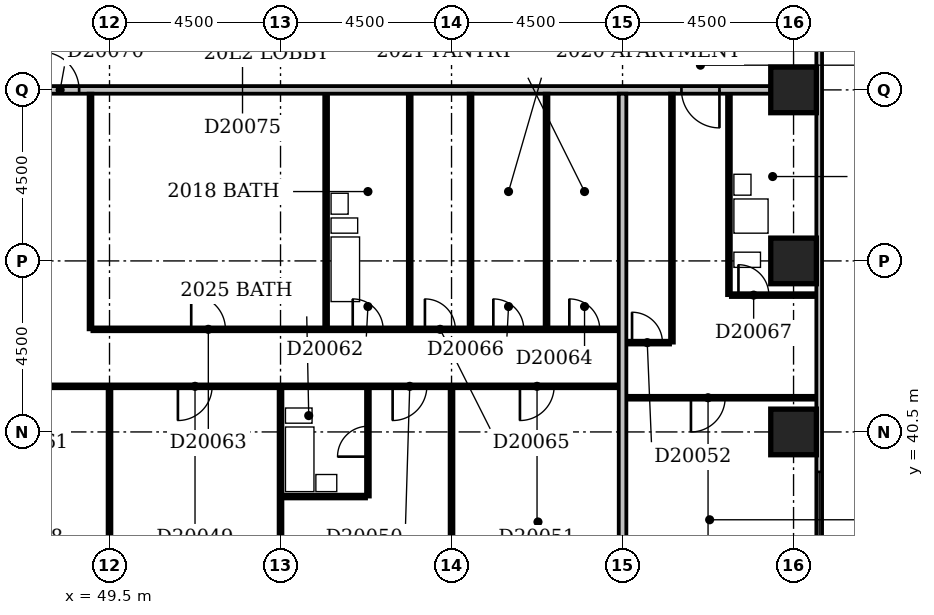
"""IFC4 building model, lengths in metres.
Left out: names, types, materials, properties, quantities, classifications, styles, units other than length and angle.
Written with IfcOpenShell. Run it as: python <this file> out.ifc"""

import sys

from ifc_helpers import new_model, si_unit, direction, frame, frame_2d, origin, origin_2d, place, context, subcontext, project, spatial, rectangle, extrude, element, fill, save


model = new_model("IFC4")
c1 = context("Model", 3, precision=1e-05, world=origin(), true_north=direction((0.0, 1.0)))
c2 = subcontext(c1, "Body", "Model", "MODEL_VIEW")
j1 = project(units=[si_unit("LENGTHUNIT", "METRE"), si_unit("PLANEANGLEUNIT", "RADIAN")], contexts=[c1])
p1 = place(None, origin())
s1 = spatial("IfcSite", under=j1, at=p1, CompositionType="ELEMENT")
p2 = place(p1, origin())
s2 = spatial("IfcBuilding", under=s1, at=p2, CompositionType="ELEMENT")
p3 = place(p2, frame((0.0, 0.0, 83.0)))
s3 = spatial("IfcBuildingStorey", under=s2, at=p3, CompositionType="ELEMENT", Elevation=83.0)
for number, where, z_axis, x_axis in (
    (1, (67.5, 40.5, -0.3), (0.0, 0.0, 1.0), (1.0, 0.0, 0.0)),
    (2, (67.5, 45.0, -0.3), (0.0, 0.0, 1.0), (1.0, 0.0, 0.0)),
    (3, (67.5, 49.5, -0.3), (0.0, 0.0, 1.0), (1.0, 0.0, 0.0)),
):
    element("IfcColumn", number, at=place(p3, frame(where, z_axis=z_axis, x_axis=x_axis)), inside=s3, PredefinedType="COLUMN", context=c2, shape_type="SweptSolid", body=[
        extrude(rectangle(XDim=1.2, YDim=1.2, at=origin_2d()), origin(), (0.0, 0.0, 1.0), 3.6),
    ])
p4 = place(p3, frame((68.175, 35.4, 0.0), z_axis=(0.0, 0.0, 1.0), x_axis=(0.0, 1.0, 0.0)))
e4 = element("IfcWall", 4, at=p4, inside=s3, PredefinedType="STANDARD", context=c2, shape_type="SweptSolid", body=[
    extrude(rectangle(XDim=23.85, YDim=0.15, at=frame_2d((11.925, 0.0))), origin(), (0.0, 0.0, 1.0), 2.7),
])
p5 = place(p4, frame((1.65, 0.0, 0.6)))
e5 = element("IfcOpeningElement", 5, at=p5, cuts=e4, PredefinedType="OPENING", context=c2, shape_type="SweptSolid", body=[
    extrude(rectangle(XDim=2.4, YDim=1.8, at=frame_2d((1.2, 0.9))), frame((0.0, 0.087, 0.0), z_axis=(0.0, -1.0, 0.0), x_axis=(1.0, 0.0, 0.0)), (0.0, 0.0, 1.0), 0.174),
])
p6 = place(p3, frame((49.5, 36.6, 0.0), z_axis=(0.0, 0.0, 1.0), x_axis=(0.0, 1.0, 0.0)))
e6 = element("IfcWall", 6, at=p6, inside=s3, PredefinedType="PARTITIONING", context=c2, shape_type="SweptSolid", body=[
    extrude(rectangle(XDim=5.05, YDim=0.1, at=frame_2d((2.525, 0.0))), origin(), (0.0, 0.0, 1.0), 3.3),
])
p7 = place(p3, frame((54.0, 36.6, 0.0), z_axis=(0.0, 0.0, 1.0), x_axis=(0.0, 1.0, 0.0)))
e7 = element("IfcWall", 7, at=p7, inside=s3, PredefinedType="PARTITIONING", context=c2, shape_type="SweptSolid", body=[
    extrude(rectangle(XDim=5.05, YDim=0.1, at=frame_2d((2.525, 0.0))), origin(), (0.0, 0.0, 1.0), 2.6),
])
p8 = place(p3, frame((58.5, 36.6, 0.0), z_axis=(0.0, 0.0, 1.0), x_axis=(0.0, 1.0, 0.0)))
e8 = element("IfcWall", 8, at=p8, inside=s3, PredefinedType="PARTITIONING", context=c2, shape_type="SweptSolid", body=[
    extrude(rectangle(XDim=5.05, YDim=0.1, at=frame_2d((2.525, 0.0))), origin(), (0.0, 0.0, 1.0), 3.3),
])
p9 = place(p3, frame((63.0, 36.6, 0.0), z_axis=(0.0, 0.0, 1.0), x_axis=(0.0, 1.0, 0.0)))
e9 = element("IfcWall", 9, at=p9, inside=s3, PredefinedType="PARTITIONING", context=c2, shape_type="SweptSolid", body=[
    extrude(rectangle(XDim=12.8, YDim=0.2, at=frame_2d((6.4, 0.0))), origin(), (0.0, 0.0, 1.0), 2.4),
])
p10 = place(p3, frame((54.05, 38.8, 0.0), z_axis=(0.0, 0.0, 1.0), x_axis=(1.0, 0.0, 0.0)))
e10 = element("IfcWall", 10, at=p10, inside=s3, PredefinedType="PLUMBINGWALL", context=c2, shape_type="SweptSolid", body=[
    extrude(rectangle(XDim=2.2, YDim=0.1, at=frame_2d((1.1, 0.0))), origin(), (0.0, 0.0, 1.0), 3.3),
])
p11 = place(p3, frame((56.3, 38.8, 0.0), z_axis=(0.0, 0.0, 1.0), x_axis=(0.0, 1.0, 0.0)))
e11 = element("IfcWall", 11, at=p11, inside=s3, PredefinedType="PLUMBINGWALL", context=c2, shape_type="SweptSolid", body=[
    extrude(rectangle(XDim=2.85, YDim=0.1, at=frame_2d((1.425, 0.0))), origin(), (0.0, 0.0, 1.0), 3.3),
])
p12 = place(p11, frame((1.05, 0.0, 0.0)))
e12 = element("IfcOpeningElement", 12, at=p12, cuts=e11, PredefinedType="OPENING", context=c2, shape_type="SweptSolid", body=[
    extrude(rectangle(XDim=0.8, YDim=2.1, at=frame_2d((0.4, 1.05))), frame((0.0, 0.062, 0.0), z_axis=(0.0, -1.0, 0.0), x_axis=(1.0, 0.0, 0.0)), (0.0, 0.0, 1.0), 0.124),
])
p13 = place(p3, frame((63.1, 41.4, 0.0), z_axis=(0.0, 0.0, 1.0), x_axis=(1.0, 0.0, 0.0)))
e13 = element("IfcWall", 13, at=p13, inside=s3, PredefinedType="PARTITIONING", context=c2, shape_type="SweptSolid", body=[
    extrude(rectangle(XDim=5.0, YDim=0.1, at=frame_2d((2.5, 0.0))), origin(), (0.0, 0.0, 1.0), 3.3),
])
p14 = place(p13, frame((1.7, 0.0, 0.0)))
e14 = element("IfcOpeningElement", 14, at=p14, cuts=e13, PredefinedType="OPENING", context=c2, shape_type="SweptSolid", body=[
    extrude(rectangle(XDim=0.9, YDim=2.1, at=frame_2d((0.45, 1.05))), frame((0.0, 0.062, 0.0), z_axis=(0.0, -1.0, 0.0), x_axis=(1.0, 0.0, 0.0)), (0.0, 0.0, 1.0), 0.124),
])
p15 = place(p3, frame((45.1, 41.7, 0.0), z_axis=(0.0, 0.0, 1.0), x_axis=(1.0, 0.0, 0.0)))
e15 = element("IfcWall", 15, at=p15, inside=s3, PredefinedType="PARTITIONING", context=c2, shape_type="SweptSolid", body=[
    extrude(rectangle(XDim=17.8, YDim=0.1, at=frame_2d((8.9, 0.0))), origin(), (0.0, 0.0, 1.0), 3.3),
])
p16 = place(p15, frame((1.7, 0.0, 0.0)))
e16 = element("IfcOpeningElement", 16, at=p16, cuts=e15, PredefinedType="OPENING", context=c2, shape_type="SweptSolid", body=[
    extrude(rectangle(XDim=0.9, YDim=2.1, at=frame_2d((0.45, 1.05))), frame((0.0, 0.062, 0.0), z_axis=(0.0, -1.0, 0.0), x_axis=(1.0, 0.0, 0.0)), (0.0, 0.0, 1.0), 0.124),
])
p17 = place(p15, frame((6.2, 0.0, 0.0)))
e17 = element("IfcOpeningElement", 17, at=p17, cuts=e15, PredefinedType="OPENING", context=c2, shape_type="SweptSolid", body=[
    extrude(rectangle(XDim=0.9, YDim=2.1, at=frame_2d((0.45, 1.05))), frame((0.0, 0.062, 0.0), z_axis=(0.0, -1.0, 0.0), x_axis=(1.0, 0.0, 0.0)), (0.0, 0.0, 1.0), 0.124),
])
p18 = place(p15, frame((11.85, 0.0, 0.0)))
e18 = element("IfcOpeningElement", 18, at=p18, cuts=e15, PredefinedType="OPENING", context=c2, shape_type="SweptSolid", body=[
    extrude(rectangle(XDim=0.9, YDim=2.1, at=frame_2d((0.45, 1.05))), frame((0.0, 0.062, 0.0), z_axis=(0.0, -1.0, 0.0), x_axis=(1.0, 0.0, 0.0)), (0.0, 0.0, 1.0), 0.124),
])
p19 = place(p15, frame((15.2, 0.0, 0.0)))
e19 = element("IfcOpeningElement", 19, at=p19, cuts=e15, PredefinedType="OPENING", context=c2, shape_type="SweptSolid", body=[
    extrude(rectangle(XDim=0.9, YDim=2.1, at=frame_2d((0.45, 1.05))), frame((0.0, 0.062, 0.0), z_axis=(0.0, -1.0, 0.0), x_axis=(1.0, 0.0, 0.0)), (0.0, 0.0, 1.0), 0.124),
])
p20 = place(p3, frame((63.1, 42.85, 0.0), z_axis=(0.0, 0.0, 1.0), x_axis=(1.0, 0.0, 0.0)))
e20 = element("IfcWall", 20, at=p20, inside=s3, PredefinedType="PARTITIONING", context=c2, shape_type="SweptSolid", body=[
    extrude(rectangle(XDim=1.15, YDim=0.1, at=frame_2d((0.575, 0.0))), origin(), (0.0, 0.0, 1.0), 3.3),
])
p21 = place(p20, frame((0.15, 0.0, 0.0)))
e21 = element("IfcOpeningElement", 21, at=p21, cuts=e20, PredefinedType="OPENING", context=c2, shape_type="SweptSolid", body=[
    extrude(rectangle(XDim=0.8, YDim=2.1, at=frame_2d((0.4, 1.05))), frame((0.0, 0.062, 0.0), z_axis=(0.0, -1.0, 0.0), x_axis=(1.0, 0.0, 0.0)), (0.0, 0.0, 1.0), 0.124),
])
p22 = place(p3, frame((64.3, 42.85, 0.0), z_axis=(0.0, 0.0, 1.0), x_axis=(0.0, 1.0, 0.0)))
e22 = element("IfcWall", 22, at=p22, inside=s3, PredefinedType="PARTITIONING", context=c2, shape_type="SweptSolid", body=[
    extrude(rectangle(XDim=6.55, YDim=0.1, at=frame_2d((3.275, 0.0))), origin(), (0.0, 0.0, 1.0), 3.3),
])
p23 = place(p3, frame((49.0, 43.2, 0.0), z_axis=(0.0, 0.0, 1.0), x_axis=(0.0, 1.0, 0.0)))
e23 = element("IfcWall", 23, at=p23, inside=s3, PredefinedType="PARTITIONING", context=c2, shape_type="SweptSolid", body=[
    extrude(rectangle(XDim=6.2, YDim=0.1, at=frame_2d((3.1, 0.0))), origin(), (0.0, 0.0, 1.0), 3.3),
])
p24 = place(p3, frame((49.05, 43.2, 0.0), z_axis=(0.0, 0.0, 1.0), x_axis=(1.0, 0.0, 0.0)))
e24 = element("IfcWall", 24, at=p24, inside=s3, PredefinedType="PARTITIONING", context=c2, shape_type="SweptSolid", body=[
    extrude(rectangle(XDim=13.85, YDim=0.1, at=frame_2d((6.925, 0.0))), origin(), (0.0, 0.0, 1.0), 3.3),
])
p25 = place(p24, frame((6.85, 0.0, 0.0)))
e25 = element("IfcOpeningElement", 25, at=p25, cuts=e24, PredefinedType="OPENING", context=c2, shape_type="SweptSolid", body=[
    extrude(rectangle(XDim=0.8, YDim=2.1, at=frame_2d((0.4, 1.05))), frame((0.0, 0.062, 0.0), z_axis=(0.0, -1.0, 0.0), x_axis=(1.0, 0.0, 0.0)), (0.0, 0.0, 1.0), 0.124),
])
p26 = place(p24, frame((2.6, 0.0, 0.0)))
e26 = element("IfcOpeningElement", 26, at=p26, cuts=e24, PredefinedType="OPENING", context=c2, shape_type="SweptSolid", body=[
    extrude(rectangle(XDim=0.9, YDim=2.1, at=frame_2d((0.45, 1.05))), frame((0.0, 0.062, 0.0), z_axis=(0.0, -1.0, 0.0), x_axis=(1.0, 0.0, 0.0)), (0.0, 0.0, 1.0), 0.124),
])
p27 = place(p24, frame((12.55, 0.0, 0.0)))
e27 = element("IfcOpeningElement", 27, at=p27, cuts=e24, PredefinedType="OPENING", context=c2, shape_type="SweptSolid", body=[
    extrude(rectangle(XDim=0.8, YDim=2.1, at=frame_2d((0.4, 1.05))), frame((0.0, 0.062, 0.0), z_axis=(0.0, -1.0, 0.0), x_axis=(1.0, 0.0, 0.0)), (0.0, 0.0, 1.0), 0.124),
])
p28 = place(p24, frame((8.75, 0.0, 0.0)))
e28 = element("IfcOpeningElement", 28, at=p28, cuts=e24, PredefinedType="OPENING", context=c2, shape_type="SweptSolid", body=[
    extrude(rectangle(XDim=0.8, YDim=2.1, at=frame_2d((0.4, 1.05))), frame((0.0, 0.062, 0.0), z_axis=(0.0, -1.0, 0.0), x_axis=(1.0, 0.0, 0.0)), (0.0, 0.0, 1.0), 0.124),
])
p29 = place(p24, frame((10.55, 0.0, 0.0)))
e29 = element("IfcOpeningElement", 29, at=p29, cuts=e24, PredefinedType="OPENING", context=c2, shape_type="SweptSolid", body=[
    extrude(rectangle(XDim=0.8, YDim=2.1, at=frame_2d((0.4, 1.05))), frame((0.0, 0.062, 0.0), z_axis=(0.0, -1.0, 0.0), x_axis=(1.0, 0.0, 0.0)), (0.0, 0.0, 1.0), 0.124),
])
for number, where, z_axis, x_axis in (
    (30, (55.2, 43.25, 0.0), (0.0, 0.0, 1.0), (0.0, 1.0, 0.0)),
    (31, (57.4, 43.25, 0.0), (0.0, 0.0, 1.0), (0.0, 1.0, 0.0)),
):
    element("IfcWall", number, at=place(p3, frame(where, z_axis=z_axis, x_axis=x_axis)), inside=s3, PredefinedType="PLUMBINGWALL", context=c2, shape_type="SweptSolid", body=[
        extrude(rectangle(XDim=6.15, YDim=0.1, at=frame_2d((3.075, 0.0))), origin(), (0.0, 0.0, 1.0), 3.3),
    ])
for number, where, z_axis, x_axis in (
    (32, (59.0, 43.25, 0.0), (0.0, 0.0, 1.0), (0.0, 1.0, 0.0)),
    (33, (61.0, 43.25, 0.0), (0.0, 0.0, 1.0), (0.0, 1.0, 0.0)),
):
    element("IfcWall", number, at=place(p3, frame(where, z_axis=z_axis, x_axis=x_axis)), inside=s3, PredefinedType="PARTITIONING", context=c2, shape_type="SweptSolid", body=[
        extrude(rectangle(XDim=6.15, YDim=0.1, at=frame_2d((3.075, 0.0))), origin(), (0.0, 0.0, 1.0), 3.3),
    ])
p30 = place(p3, frame((65.8, 44.1, 0.0), z_axis=(0.0, 0.0, 1.0), x_axis=(0.0, 1.0, 0.0)))
e34 = element("IfcWall", 34, at=p30, inside=s3, PredefinedType="PLUMBINGWALL", context=c2, shape_type="SweptSolid", body=[
    extrude(rectangle(XDim=5.3, YDim=0.1, at=frame_2d((2.65, 0.0))), origin(), (0.0, 0.0, 1.0), 3.3),
])
p31 = place(p3, frame((65.85, 44.1, 0.0), z_axis=(0.0, 0.0, 1.0), x_axis=(1.0, 0.0, 0.0)))
e35 = element("IfcWall", 35, at=p31, inside=s3, PredefinedType="PARTITIONING", context=c2, shape_type="SweptSolid", body=[
    extrude(rectangle(XDim=2.25, YDim=0.1, at=frame_2d((1.125, 0.0))), origin(), (0.0, 0.0, 1.0), 3.3),
])
p32 = place(p31, frame((0.2, 0.0, 0.0)))
e36 = element("IfcOpeningElement", 36, at=p32, cuts=e35, PredefinedType="OPENING", context=c2, shape_type="SweptSolid", body=[
    extrude(rectangle(XDim=0.8, YDim=2.1, at=frame_2d((0.4, 1.05))), frame((0.0, 0.062, 0.0), z_axis=(0.0, -1.0, 0.0), x_axis=(1.0, 0.0, 0.0)), (0.0, 0.0, 1.0), 0.124),
])
p33 = place(p3, frame((9.1, 49.5, 0.0), z_axis=(0.0, 0.0, 1.0), x_axis=(1.0, 0.0, 0.0)))
e37 = element("IfcWall", 37, at=p33, inside=s3, PredefinedType="PARTITIONING", context=c2, shape_type="SweptSolid", body=[
    extrude(rectangle(XDim=57.8, YDim=0.2, at=frame_2d((28.9, 0.0))), origin(), (0.0, 0.0, 1.0), 3.3),
])
p34 = place(p33, frame((13.7, 0.0, 0.0)))
e38 = element("IfcOpeningElement", 38, at=p34, cuts=e37, PredefinedType="OPENING", context=c2, shape_type="SweptSolid", body=[
    extrude(rectangle(XDim=1.0, YDim=2.1, at=frame_2d((0.5, 1.05))), frame((0.0, 0.112, 0.0), z_axis=(0.0, -1.0, 0.0), x_axis=(1.0, 0.0, 0.0)), (0.0, 0.0, 1.0), 0.224),
])
p35 = place(p33, frame((22.7, 0.0, 0.0)))
e39 = element("IfcOpeningElement", 39, at=p35, cuts=e37, PredefinedType="OPENING", context=c2, shape_type="SweptSolid", body=[
    extrude(rectangle(XDim=1.0, YDim=2.1, at=frame_2d((0.5, 1.05))), frame((0.0, 0.112, 0.0), z_axis=(0.0, -1.0, 0.0), x_axis=(1.0, 0.0, 0.0)), (0.0, 0.0, 1.0), 0.224),
])
p36 = place(p33, frame((38.6, 0.0, 0.0)))
e40 = element("IfcOpeningElement", 40, at=p36, cuts=e37, PredefinedType="OPENING", context=c2, shape_type="SweptSolid", body=[
    extrude(rectangle(XDim=1.0, YDim=2.1, at=frame_2d((0.5, 1.05))), frame((0.0, 0.112, 0.0), z_axis=(0.0, -1.0, 0.0), x_axis=(1.0, 0.0, 0.0)), (0.0, 0.0, 1.0), 0.224),
])
p37 = place(p33, frame((55.45, 0.0, 0.0)))
e41 = element("IfcOpeningElement", 41, at=p37, cuts=e37, PredefinedType="OPENING", context=c2, shape_type="SweptSolid", body=[
    extrude(rectangle(XDim=1.0, YDim=2.1, at=frame_2d((0.5, 1.05))), frame((0.0, 0.112, 0.0), z_axis=(0.0, -1.0, 0.0), x_axis=(1.0, 0.0, 0.0)), (0.0, 0.0, 1.0), 0.224),
])
p38 = place(p33, frame((6.15, 0.0, 0.0)))
e42 = element("IfcOpeningElement", 42, at=p38, cuts=e37, PredefinedType="OPENING", context=c2, shape_type="SweptSolid", body=[
    extrude(rectangle(XDim=0.9, YDim=2.1, at=frame_2d((0.45, 1.05))), frame((0.0, 0.112, 0.0), z_axis=(0.0, -1.0, 0.0), x_axis=(1.0, 0.0, 0.0)), (0.0, 0.0, 1.0), 0.224),
])
p39 = place(p5, origin())
e43 = element("IfcWindow", 43, at=p39, inside=s3, PartitioningType="SINGLE_PANEL", PredefinedType="WINDOW", context=c2, shape_type="SweptSolid", body=[
    extrude(rectangle(XDim=2.4, YDim=1.8, at=frame_2d((1.2, 0.9))), frame((0.0, 0.03, 0.0), z_axis=(0.0, -1.0, 0.0), x_axis=(1.0, 0.0, 0.0)), (0.0, 0.0, 1.0), 0.06),
])
fill(e5, e43)
p40 = place(p12, origin())
e44 = element("IfcDoor", 44, at=p40, inside=s3, OperationType="SINGLE_SWING_LEFT", PredefinedType="DOOR", context=c2, shape_type="SweptSolid", body=[
    extrude(rectangle(XDim=0.8, YDim=2.1, at=frame_2d((0.4, 1.05))), frame((0.0, 0.025, 0.0), z_axis=(0.0, -1.0, 0.0), x_axis=(1.0, 0.0, 0.0)), (0.0, 0.0, 1.0), 0.05),
])
fill(e12, e44)
p41 = place(p14, frame((0.9, 0.0, 0.0), z_axis=(0.0, 0.0, 1.0), x_axis=(-1.0, 0.0, 0.0)))
e45 = element("IfcDoor", 45, at=p41, inside=s3, OperationType="SINGLE_SWING_RIGHT", PredefinedType="DOOR", context=c2, shape_type="SweptSolid", body=[
    extrude(rectangle(XDim=0.9, YDim=2.1, at=frame_2d((0.45, 1.05))), frame((0.0, 0.025, 0.0), z_axis=(0.0, -1.0, 0.0), x_axis=(1.0, 0.0, 0.0)), (0.0, 0.0, 1.0), 0.05),
])
fill(e14, e45)
p42 = place(p17, frame((0.9, 0.0, 0.0), z_axis=(0.0, 0.0, 1.0), x_axis=(-1.0, 0.0, 0.0)))
e46 = element("IfcDoor", 46, at=p42, inside=s3, OperationType="SINGLE_SWING_RIGHT", PredefinedType="DOOR", context=c2, shape_type="SweptSolid", body=[
    extrude(rectangle(XDim=0.9, YDim=2.1, at=frame_2d((0.45, 1.05))), frame((0.0, 0.025, 0.0), z_axis=(0.0, -1.0, 0.0), x_axis=(1.0, 0.0, 0.0)), (0.0, 0.0, 1.0), 0.05),
])
fill(e17, e46)
p43 = place(p18, frame((0.9, 0.0, 0.0), z_axis=(0.0, 0.0, 1.0), x_axis=(-1.0, 0.0, 0.0)))
e47 = element("IfcDoor", 47, at=p43, inside=s3, OperationType="SINGLE_SWING_RIGHT", PredefinedType="DOOR", context=c2, shape_type="SweptSolid", body=[
    extrude(rectangle(XDim=0.9, YDim=2.1, at=frame_2d((0.45, 1.05))), frame((0.0, 0.025, 0.0), z_axis=(0.0, -1.0, 0.0), x_axis=(1.0, 0.0, 0.0)), (0.0, 0.0, 1.0), 0.05),
])
fill(e18, e47)
p44 = place(p19, frame((0.9, 0.0, 0.0), z_axis=(0.0, 0.0, 1.0), x_axis=(-1.0, 0.0, 0.0)))
e48 = element("IfcDoor", 48, at=p44, inside=s3, OperationType="SINGLE_SWING_RIGHT", PredefinedType="DOOR", context=c2, shape_type="SweptSolid", body=[
    extrude(rectangle(XDim=0.9, YDim=2.1, at=frame_2d((0.45, 1.05))), frame((0.0, 0.025, 0.0), z_axis=(0.0, -1.0, 0.0), x_axis=(1.0, 0.0, 0.0)), (0.0, 0.0, 1.0), 0.05),
])
fill(e19, e48)
p45 = place(p21, origin())
e49 = element("IfcDoor", 49, at=p45, inside=s3, OperationType="SINGLE_SWING_LEFT", PredefinedType="DOOR", context=c2, shape_type="SweptSolid", body=[
    extrude(rectangle(XDim=0.8, YDim=2.1, at=frame_2d((0.4, 1.05))), frame((0.0, 0.025, 0.0), z_axis=(0.0, -1.0, 0.0), x_axis=(1.0, 0.0, 0.0)), (0.0, 0.0, 1.0), 0.05),
])
fill(e21, e49)
p46 = place(p25, origin())
e50 = element("IfcDoor", 50, at=p46, inside=s3, OperationType="SINGLE_SWING_LEFT", PredefinedType="DOOR", context=c2, shape_type="SweptSolid", body=[
    extrude(rectangle(XDim=0.8, YDim=2.1, at=frame_2d((0.4, 1.05))), frame((0.0, 0.025, 0.0), z_axis=(0.0, -1.0, 0.0), x_axis=(1.0, 0.0, 0.0)), (0.0, 0.0, 1.0), 0.05),
])
fill(e25, e50)
p47 = place(p26, origin())
e51 = element("IfcDoor", 51, at=p47, inside=s3, OperationType="SINGLE_SWING_LEFT", PredefinedType="DOOR", context=c2, shape_type="SweptSolid", body=[
    extrude(rectangle(XDim=0.9, YDim=2.1, at=frame_2d((0.45, 1.05))), frame((0.0, 0.025, 0.0), z_axis=(0.0, -1.0, 0.0), x_axis=(1.0, 0.0, 0.0)), (0.0, 0.0, 1.0), 0.05),
])
fill(e26, e51)
p48 = place(p27, origin())
e52 = element("IfcDoor", 52, at=p48, inside=s3, OperationType="SINGLE_SWING_LEFT", PredefinedType="DOOR", context=c2, shape_type="SweptSolid", body=[
    extrude(rectangle(XDim=0.8, YDim=2.1, at=frame_2d((0.4, 1.05))), frame((0.0, 0.025, 0.0), z_axis=(0.0, -1.0, 0.0), x_axis=(1.0, 0.0, 0.0)), (0.0, 0.0, 1.0), 0.05),
])
fill(e27, e52)
p49 = place(p28, origin())
e53 = element("IfcDoor", 53, at=p49, inside=s3, OperationType="SINGLE_SWING_LEFT", PredefinedType="DOOR", context=c2, shape_type="SweptSolid", body=[
    extrude(rectangle(XDim=0.8, YDim=2.1, at=frame_2d((0.4, 1.05))), frame((0.0, 0.025, 0.0), z_axis=(0.0, -1.0, 0.0), x_axis=(1.0, 0.0, 0.0)), (0.0, 0.0, 1.0), 0.05),
])
fill(e28, e53)
p50 = place(p29, origin())
e54 = element("IfcDoor", 54, at=p50, inside=s3, OperationType="SINGLE_SWING_LEFT", PredefinedType="DOOR", context=c2, shape_type="SweptSolid", body=[
    extrude(rectangle(XDim=0.8, YDim=2.1, at=frame_2d((0.4, 1.05))), frame((0.0, 0.025, 0.0), z_axis=(0.0, -1.0, 0.0), x_axis=(1.0, 0.0, 0.0)), (0.0, 0.0, 1.0), 0.05),
])
fill(e29, e54)
p51 = place(p32, origin())
e55 = element("IfcDoor", 55, at=p51, inside=s3, OperationType="SINGLE_SWING_LEFT", PredefinedType="DOOR", context=c2, shape_type="SweptSolid", body=[
    extrude(rectangle(XDim=0.8, YDim=2.1, at=frame_2d((0.4, 1.05))), frame((0.0, 0.025, 0.0), z_axis=(0.0, -1.0, 0.0), x_axis=(1.0, 0.0, 0.0)), (0.0, 0.0, 1.0), 0.05),
])
fill(e36, e55)
p52 = place(p36, origin())
e56 = element("IfcDoor", 56, at=p52, inside=s3, OperationType="SINGLE_SWING_LEFT", PredefinedType="DOOR", context=c2, shape_type="SweptSolid", body=[
    extrude(rectangle(XDim=1.0, YDim=2.1, at=frame_2d((0.5, 1.05))), frame((0.0, 0.025, 0.0), z_axis=(0.0, -1.0, 0.0), x_axis=(1.0, 0.0, 0.0)), (0.0, 0.0, 1.0), 0.05),
])
fill(e40, e56)
p53 = place(p37, origin())
e57 = element("IfcDoor", 57, at=p53, inside=s3, OperationType="SINGLE_SWING_RIGHT", PredefinedType="DOOR", context=c2, shape_type="SweptSolid", body=[
    extrude(rectangle(XDim=1.0, YDim=2.1, at=frame_2d((0.5, 1.05))), frame((0.0, 0.025, 0.0), z_axis=(0.0, -1.0, 0.0), x_axis=(1.0, 0.0, 0.0)), (0.0, 0.0, 1.0), 0.05),
])
fill(e41, e57)
save(model, sys.argv[1])
